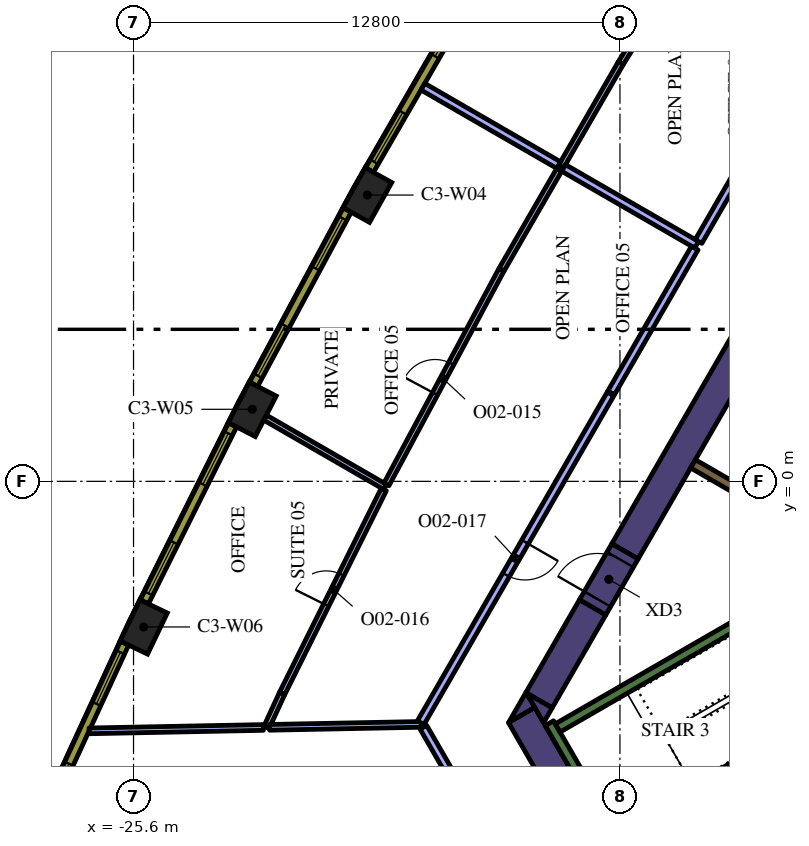
"""IFC4 building model, lengths in metres.
Left out: names, types, materials, properties, quantities, classifications, styles, units other than length and angle.
Written with IfcOpenShell. Run it as: python <this file> out.ifc"""

import sys

from ifc_helpers import new_model, si_unit, direction, frame, frame_2d, origin, origin_2d, place, context, subcontext, project, spatial, polyline, rectangle, outline, extrude, element, fill, save


model = new_model("IFC4")
c1 = context("Model", 3, precision=1e-05, world=origin(), true_north=direction((0.0, 1.0)))
c2 = subcontext(c1, "Body", "Model", "MODEL_VIEW")
j1 = project(units=[si_unit("LENGTHUNIT", "METRE"), si_unit("PLANEANGLEUNIT", "RADIAN")], contexts=[c1])
p1 = place(None, origin())
s1 = spatial("IfcSite", under=j1, at=p1, CompositionType="ELEMENT")
p2 = place(p1, origin())
s2 = spatial("IfcBuilding", under=s1, at=p2, CompositionType="ELEMENT")
p3 = place(p2, frame((0.0, 0.0, 162.6)))
s3 = spatial("IfcBuildingStorey", under=s2, at=p3, CompositionType="ELEMENT", Elevation=162.6)
for number, where, z_axis, x_axis in (
    (1, (-19.447, 7.533, 0.0), (0.0, 0.0, 1.0), (-0.487, -0.874, 0.0)),
    (2, (-22.476, 1.896, 0.0), (0.0, 0.0, 1.0), (-0.46, -0.888, 0.0)),
    (3, (-25.332, -3.832, 0.0), (0.0, 0.0, 1.0), (-0.433, -0.902, 0.0)),
):
    element("IfcColumn", number, at=place(p3, frame(where, z_axis=z_axis, x_axis=x_axis)), inside=s3, PredefinedType="COLUMN", context=c2, shape_type="SweptSolid", body=[
        extrude(rectangle(XDim=1.2, YDim=0.8, at=origin_2d()), origin(), (0.0, 0.0, 1.0), 4.2),
    ])
p4 = place(p3, frame((-15.387, -6.148, 0.0), z_axis=(0.0, 0.0, 1.0), x_axis=(0.499984020225, -0.866034629516, 0.0)))
e4 = element("IfcWall", 4, at=p4, inside=s3, PredefinedType="SOLIDWALL", context=c2, shape_type="SweptSolid", body=[
    extrude(rectangle(XDim=3.824, YDim=0.8, at=frame_2d((1.912, 0.0))), origin(), (0.0, 0.0, 1.0), 4.2),
])
p5 = place(p3, origin())
e5 = element("IfcWall", 5, at=p5, inside=s3, PredefinedType="SOLIDWALL", context=c2, shape_type="SweptSolid", body=[
    extrude(outline(polyline([(-15.042, -5.947), (-15.729, -6.343), (-15.271, -5.55), (-15.042, -5.947)])), origin(), (0.0, 0.0, 1.0), 4.2),
])
p6 = place(p3, frame((-13.518, -3.314, 0.0), z_axis=(0.0, 0.0, 1.0), x_axis=(-0.499969377405, -0.866043083026, 0.0)))
e6 = element("IfcWall", 6, at=p6, inside=s3, PredefinedType="SOLIDWALL", context=c2, shape_type="SweptSolid", body=[
    extrude(rectangle(XDim=2.824, YDim=0.8, at=frame_2d((1.412, 0.0))), origin(), (0.0, 0.0, 1.0), 4.2),
])
e7 = element("IfcWall", 7, at=p5, inside=s3, PredefinedType="SOLIDWALL", context=c2, shape_type="SweptSolid", body=[
    extrude(outline(polyline([(-14.809, -6.35), (-15.257, -5.574), (-14.585, -5.962), (-14.809, -6.35)])), origin(), (0.0, 0.0, 1.0), 4.2),
])
p7 = place(p3, frame((-12.668, -1.842, 0.0), z_axis=(0.0, 0.0, 1.0), x_axis=(0.500003640647, 0.866023301845, 0.0)))
e8 = element("IfcWall", 8, at=p7, inside=s3, PredefinedType="SOLIDWALL", context=c2, shape_type="SweptSolid", body=[
    extrude(rectangle(XDim=15.858, YDim=0.8, at=frame_2d((7.929, 0.0))), origin(), (0.0, 0.0, 1.0), 4.2),
])
p8 = place(p3, frame((-12.84, -9.511, 0.0), z_axis=(0.0, 0.0, 1.0), x_axis=(-0.499997733992, 0.866026712061, 0.0)))
e9 = element("IfcWall", 9, at=p8, inside=s3, PredefinedType="SOLIDWALL", context=c2, shape_type="SweptSolid", body=[
    extrude(rectangle(XDim=3.634, YDim=0.25, at=frame_2d((1.817, 0.0))), origin(), (0.0, 0.0, 1.0), 4.2),
])
p9 = place(p3, frame((-14.44, -6.49, 0.0), z_axis=(0.0, 0.0, 1.0), x_axis=(0.866022966069, 0.500004222222, 0.0)))
e10 = element("IfcWall", 10, at=p9, inside=s3, PredefinedType="SOLIDWALL", context=c2, shape_type="SweptSolid", body=[
    extrude(rectangle(XDim=6.8, YDim=0.25, at=frame_2d((3.4, 0.0))), origin(), (0.0, 0.0, 1.0), 4.2),
])
p10 = place(p3, frame((-12.84, -9.261, 0.0), z_axis=(0.0, 0.0, 1.0), x_axis=(0.866016039709, 0.500016218704, 0.0)))
e11 = element("IfcWall", 11, at=p10, inside=s3, PredefinedType="SOLIDWALL", context=c2, shape_type="SweptSolid", body=[
    extrude(rectangle(XDim=7.05, YDim=0.25, at=frame_2d((3.525, 0.0))), origin(), (0.0, 0.0, 1.0), 4.2),
])
p11 = place(p3, frame((-8.106, -1.14, 0.0), z_axis=(0.0, 0.0, 1.0), x_axis=(-0.866008981251, 0.500028443584, 0.0)))
e12 = element("IfcWall", 12, at=p11, inside=s3, PredefinedType="SOLIDWALL", context=c2, shape_type="SweptSolid", body=[
    extrude(rectangle(XDim=3.2, YDim=0.25, at=frame_2d((1.6, 0.0))), origin(), (0.0, 0.0, 1.0), 4.2),
])
p12 = place(p3, frame((-13.518, -3.314, 0.0), z_axis=(0.0, 0.0, 1.0), x_axis=(0.500062241894, 0.865989465428, 0.0)))
e13 = element("IfcWall", 13, at=p12, inside=s3, PredefinedType="SOLIDWALL", context=c2, shape_type="SweptSolid", body=[
    extrude(rectangle(XDim=1.7, YDim=0.8, at=frame_2d((0.85, 0.0))), origin(), (0.0, 0.0, 1.0), 4.2),
])
p13 = place(p12, frame((0.25, 0.0, 0.0)))
e14 = element("IfcOpeningElement", 14, at=p13, cuts=e13, PredefinedType="OPENING", context=c2, shape_type="SweptSolid", body=[
    extrude(rectangle(XDim=1.2, YDim=2.1, at=frame_2d((0.6, 1.05))), frame((0.0, 0.41, 0.0), z_axis=(0.0, -1.0, 0.0), x_axis=(1.0, 0.0, 0.0)), (0.0, 0.0, 1.0), 0.82),
])
p14 = place(p3, frame((-12.779, 11.002, 0.0), z_axis=(0.0, 0.0, 1.0), x_axis=(0.527026092571, 0.849849102929, 0.0)))
e15 = element("IfcWall", 15, at=p14, inside=s3, PredefinedType="PARTITIONING", context=c2, shape_type="SweptSolid", body=[
    extrude(rectangle(XDim=6.407, YDim=0.15, at=frame_2d((3.204, 0.0))), origin(), (0.0, 0.0, 1.0), 3.15),
])
p15 = place(p14, frame((2.707, 0.0, 0.0)))
e16 = element("IfcOpeningElement", 16, at=p15, cuts=e15, PredefinedType="OPENING", context=c2, shape_type="SweptSolid", body=[
    extrude(rectangle(XDim=0.9, YDim=2.1, at=frame_2d((0.45, 1.05))), frame((0.0, 0.085, 0.0), z_axis=(0.0, -1.0, 0.0), x_axis=(1.0, 0.0, 0.0)), (0.0, 0.0, 1.0), 0.17),
])
p16 = place(p3, frame((-12.779, 11.002, 0.0), z_axis=(0.0, 0.0, 1.0), x_axis=(-0.499996312652, -0.866027532665, 0.0)))
e17 = element("IfcWall", 17, at=p16, inside=s3, PredefinedType="PARTITIONING", context=c2, shape_type="SweptSolid", body=[
    extrude(rectangle(XDim=3.138, YDim=0.15, at=frame_2d((1.569, 0.0))), origin(), (0.0, 0.0, 1.0), 3.15),
])
p17 = place(p3, frame((-14.413, 8.322, 0.0), z_axis=(0.0, 0.0, 1.0), x_axis=(-0.866034795751, 0.499983732284, 0.0)))
e18 = element("IfcWall", 18, at=p17, inside=s3, PredefinedType="PARTITIONING", context=c2, shape_type="SweptSolid", body=[
    extrude(rectangle(XDim=4.125, YDim=0.2, at=frame_2d((2.062, 0.0))), origin(), (0.0, 0.0, 1.0), 3.15),
])
p18 = place(p3, frame((-10.782, 6.225, 0.0), z_axis=(0.0, 0.0, 1.0), x_axis=(-0.866034752867, 0.499983806564, 0.0)))
e19 = element("IfcWall", 19, at=p18, inside=s3, PredefinedType="PARTITIONING", context=c2, shape_type="SweptSolid", body=[
    extrude(rectangle(XDim=4.043, YDim=0.2, at=frame_2d((2.021, 0.0))), origin(), (0.0, 0.0, 1.0), 3.15),
])
p19 = place(p3, frame((-8.532, 10.122, 0.0), z_axis=(0.0, 0.0, 1.0), x_axis=(-0.499988222896, -0.866032203192, 0.0)))
e20 = element("IfcWall", 20, at=p19, inside=s3, PredefinedType="PARTITIONING", context=c2, shape_type="SweptSolid", body=[
    extrude(rectangle(XDim=4.4, YDim=0.2, at=frame_2d((2.2, 0.0))), origin(), (0.0, 0.0, 1.0), 3.15),
])
p20 = place(p3, frame((-18.98, -0.147, 0.0), z_axis=(0.0, 0.0, 1.0), x_axis=(-0.866035116605, 0.499983176524, 0.0)))
e21 = element("IfcWall", 21, at=p20, inside=s3, PredefinedType="PARTITIONING", context=c2, shape_type="SweptSolid", body=[
    extrude(rectangle(XDim=3.648, YDim=0.15, at=frame_2d((1.824, 0.0))), origin(), (0.0, 0.0, 1.0), 3.15),
])
p21 = place(p3, frame((-14.398, 8.198, 0.0), z_axis=(0.0, 0.0, 1.0), x_axis=(-0.499993740961, -0.866029017412, 0.0)))
e22 = element("IfcWall", 22, at=p21, inside=s3, PredefinedType="PARTITIONING", context=c2, shape_type="SweptSolid", body=[
    extrude(rectangle(XDim=3.038, YDim=0.15, at=frame_2d((1.519, 0.0))), origin(), (0.0, 0.0, 1.0), 3.15),
])
p22 = place(p3, frame((-18.945, -0.081, 0.0), z_axis=(0.0, 0.0, 1.0), x_axis=(0.472485737981, 0.881338316088, 0.0)))
e23 = element("IfcWall", 23, at=p22, inside=s3, PredefinedType="PARTITIONING", context=c2, shape_type="SweptSolid", body=[
    extrude(rectangle(XDim=6.407, YDim=0.15, at=frame_2d((3.204, 0.0))), origin(), (0.0, 0.0, 1.0), 3.15),
])
p23 = place(p22, frame((2.707, 0.0, 0.0)))
e24 = element("IfcOpeningElement", 24, at=p23, cuts=e23, PredefinedType="OPENING", context=c2, shape_type="SweptSolid", body=[
    extrude(rectangle(XDim=0.9, YDim=2.1, at=frame_2d((0.45, 1.05))), frame((0.0, 0.085, 0.0), z_axis=(0.0, -1.0, 0.0), x_axis=(1.0, 0.0, 0.0)), (0.0, 0.0, 1.0), 0.17),
])
p24 = place(p3, frame((-21.689, -5.579, 0.0), z_axis=(0.0, 0.0, 1.0), x_axis=(0.446219729364, 0.894923434225, 0.0)))
e25 = element("IfcWall", 25, at=p24, inside=s3, PredefinedType="PARTITIONING", context=c2, shape_type="SweptSolid", body=[
    extrude(rectangle(XDim=5.995, YDim=0.15, at=frame_2d((2.998, 0.0))), origin(), (0.0, 0.0, 1.0), 3.15),
])
p25 = place(p24, frame((2.595, 0.0, 0.0)))
e26 = element("IfcOpeningElement", 26, at=p25, cuts=e25, PredefinedType="OPENING", context=c2, shape_type="SweptSolid", body=[
    extrude(rectangle(XDim=0.9, YDim=2.1, at=frame_2d((0.45, 1.05))), frame((0.0, 0.085, 0.0), z_axis=(0.0, -1.0, 0.0), x_axis=(1.0, 0.0, 0.0)), (0.0, 0.0, 1.0), 0.17),
])
p26 = place(p3, frame((-21.689, -5.579, 0.0), z_axis=(0.0, 0.0, 1.0), x_axis=(-0.418649696334, -0.908147802816, 0.0)))
e27 = element("IfcWall", 27, at=p26, inside=s3, PredefinedType="PARTITIONING", context=c2, shape_type="SweptSolid", body=[
    extrude(rectangle(XDim=0.986, YDim=0.15, at=frame_2d((0.493, 0.0))), origin(), (0.0, 0.0, 1.0), 3.15),
])
p27 = place(p3, frame((-22.185, -6.476, 0.0), z_axis=(0.0, 0.0, 1.0), x_axis=(-0.999810025733, -0.019491342784, 0.0)))
e28 = element("IfcWall", 28, at=p27, inside=s3, PredefinedType="PARTITIONING", context=c2, shape_type="SweptSolid", body=[
    extrude(rectangle(XDim=4.584, YDim=0.15, at=frame_2d((2.292, 0.0))), origin(), (0.0, 0.0, 1.0), 3.15),
])
p28 = place(p3, frame((-18.016, -6.395, 0.0), z_axis=(0.0, 0.0, 1.0), x_axis=(-0.999809528944, -0.019516808959, 0.0)))
e29 = element("IfcWall", 29, at=p28, inside=s3, PredefinedType="PARTITIONING", context=c2, shape_type="SweptSolid", body=[
    extrude(rectangle(XDim=4.003, YDim=0.15, at=frame_2d((2.001, 0.0))), origin(), (0.0, 0.0, 1.0), 3.15),
])
p29 = place(p3, frame((-10.832, 6.138, 0.0), z_axis=(0.0, 0.0, 1.0), x_axis=(-0.499988222896, -0.866032203192, 0.0)))
e30 = element("IfcWall", 30, at=p29, inside=s3, PredefinedType="PARTITIONING", context=c2, shape_type="SweptSolid", body=[
    extrude(rectangle(XDim=4.4, YDim=0.2, at=frame_2d((2.2, 0.0))), origin(), (0.0, 0.0, 1.0), 3.15),
])
p30 = place(p3, frame((-13.047, 2.302, 0.0), z_axis=(0.0, 0.0, 1.0), x_axis=(-0.499986873641, -0.866032982159, 0.0)))
e31 = element("IfcWall", 31, at=p30, inside=s3, PredefinedType="PARTITIONING", context=c2, shape_type="SweptSolid", body=[
    extrude(rectangle(XDim=9.99, YDim=0.2, at=frame_2d((4.995, 0.0))), origin(), (0.0, 0.0, 1.0), 3.15),
])
p31 = place(p30, frame((4.5, 0.0, 0.0)))
e32 = element("IfcOpeningElement", 32, at=p31, cuts=e31, PredefinedType="OPENING", context=c2, shape_type="SweptSolid", body=[
    extrude(rectangle(XDim=1.0, YDim=2.1, at=frame_2d((0.5, 1.05))), frame((0.0, 0.11, 0.0), z_axis=(0.0, -1.0, 0.0), x_axis=(1.0, 0.0, 0.0)), (0.0, 0.0, 1.0), 0.22),
])
p32 = place(p3, frame((-17.974, -6.469, 0.0), z_axis=(0.0, 0.0, 1.0), x_axis=(0.499961062019, -0.866047883471, 0.0)))
e33 = element("IfcWall", 33, at=p32, inside=s3, PredefinedType="PARTITIONING", context=c2, shape_type="SweptSolid", body=[
    extrude(rectangle(XDim=2.185, YDim=0.2, at=frame_2d((1.092, 0.0))), origin(), (0.0, 0.0, 1.0), 3.15),
])
p33 = place(p3, frame((-16.789, 12.697, 0.0), z_axis=(0.0, 0.0, 1.0), x_axis=(-0.500009456303, -0.866019944116, 0.0)))
e34 = element("IfcWall", 34, at=p33, inside=s3, PredefinedType="SOLIDWALL", context=c2, shape_type="SweptSolid", body=[
    extrude(rectangle(XDim=5.204, YDim=0.24, at=frame_2d((2.602, 0.0))), origin(), (0.0, 0.0, 1.0), 3.95),
])
p34 = place(p33, frame((0.248, 0.0, 0.9)))
e35 = element("IfcOpeningElement", 35, at=p34, cuts=e34, PredefinedType="OPENING", context=c2, shape_type="SweptSolid", body=[
    extrude(rectangle(XDim=1.5, YDim=2.55, at=frame_2d((0.75, 1.275))), frame((0.0, 0.13, 0.0), z_axis=(0.0, -1.0, 0.0), x_axis=(1.0, 0.0, 0.0)), (0.0, 0.0, 1.0), 0.26),
])
p35 = place(p33, frame((3.455, 0.0, 0.9)))
e36 = element("IfcOpeningElement", 36, at=p35, cuts=e34, PredefinedType="OPENING", context=c2, shape_type="SweptSolid", body=[
    extrude(rectangle(XDim=1.5, YDim=2.55, at=frame_2d((0.75, 1.275))), frame((0.0, 0.13, 0.0), z_axis=(0.0, -1.0, 0.0), x_axis=(1.0, 0.0, 0.0)), (0.0, 0.0, 1.0), 0.26),
])
p36 = place(p3, frame((-19.977, 7.139, 0.0), z_axis=(0.0, 0.0, 1.0), x_axis=(-0.473349833294, -0.880874528704, 0.0)))
e37 = element("IfcWall", 37, at=p36, inside=s3, PredefinedType="SOLIDWALL", context=c2, shape_type="SweptSolid", body=[
    extrude(rectangle(XDim=5.204, YDim=0.24, at=frame_2d((2.602, 0.0))), origin(), (0.0, 0.0, 1.0), 3.95),
])
p37 = place(p36, frame((0.248, 0.0, 0.9)))
e38 = element("IfcOpeningElement", 38, at=p37, cuts=e37, PredefinedType="OPENING", context=c2, shape_type="SweptSolid", body=[
    extrude(rectangle(XDim=1.5, YDim=2.55, at=frame_2d((0.75, 1.275))), frame((0.0, 0.13, 0.0), z_axis=(0.0, -1.0, 0.0), x_axis=(1.0, 0.0, 0.0)), (0.0, 0.0, 1.0), 0.26),
])
p38 = place(p36, frame((3.455, 0.0, 0.9)))
e39 = element("IfcOpeningElement", 39, at=p38, cuts=e37, PredefinedType="OPENING", context=c2, shape_type="SweptSolid", body=[
    extrude(rectangle(XDim=1.5, YDim=2.55, at=frame_2d((0.75, 1.275))), frame((0.0, 0.13, 0.0), z_axis=(0.0, -1.0, 0.0), x_axis=(1.0, 0.0, 0.0)), (0.0, 0.0, 1.0), 0.26),
])
p39 = place(p3, frame((-22.994, 1.485, 0.0), z_axis=(0.0, 0.0, 1.0), x_axis=(-0.446256171312, -0.8949052629, 0.0)))
e40 = element("IfcWall", 40, at=p39, inside=s3, PredefinedType="SOLIDWALL", context=c2, shape_type="SweptSolid", body=[
    extrude(rectangle(XDim=5.203, YDim=0.24, at=frame_2d((2.602, 0.0))), origin(), (0.0, 0.0, 1.0), 3.95),
])
p40 = place(p39, frame((0.248, 0.0, 0.9)))
e41 = element("IfcOpeningElement", 41, at=p40, cuts=e40, PredefinedType="OPENING", context=c2, shape_type="SweptSolid", body=[
    extrude(rectangle(XDim=1.5, YDim=2.55, at=frame_2d((0.75, 1.275))), frame((0.0, 0.13, 0.0), z_axis=(0.0, -1.0, 0.0), x_axis=(1.0, 0.0, 0.0)), (0.0, 0.0, 1.0), 0.26),
])
p41 = place(p39, frame((3.455, 0.0, 0.9)))
e42 = element("IfcOpeningElement", 42, at=p41, cuts=e40, PredefinedType="OPENING", context=c2, shape_type="SweptSolid", body=[
    extrude(rectangle(XDim=1.5, YDim=2.55, at=frame_2d((0.75, 1.275))), frame((0.0, 0.13, 0.0), z_axis=(0.0, -1.0, 0.0), x_axis=(1.0, 0.0, 0.0)), (0.0, 0.0, 1.0), 0.26),
])
p42 = place(p3, frame((-25.837, -4.258, 0.0), z_axis=(0.0, 0.0, 1.0), x_axis=(-0.418722559465, -0.908114209885, 0.0)))
e43 = element("IfcWall", 43, at=p42, inside=s3, PredefinedType="SOLIDWALL", context=c2, shape_type="SweptSolid", body=[
    extrude(rectangle(XDim=5.213, YDim=0.24, at=frame_2d((2.606, 0.0))), origin(), (0.0, 0.0, 1.0), 3.95),
])
p43 = place(p42, frame((0.261, 0.0, 0.9)))
e44 = element("IfcOpeningElement", 44, at=p43, cuts=e43, PredefinedType="OPENING", context=c2, shape_type="SweptSolid", body=[
    extrude(rectangle(XDim=1.5, YDim=2.55, at=frame_2d((0.75, 1.275))), frame((0.0, 0.13, 0.0), z_axis=(0.0, -1.0, 0.0), x_axis=(1.0, 0.0, 0.0)), (0.0, 0.0, 1.0), 0.26),
])
p44 = place(p42, frame((3.492, 0.0, 0.9)))
e45 = element("IfcOpeningElement", 45, at=p44, cuts=e43, PredefinedType="OPENING", context=c2, shape_type="SweptSolid", body=[
    extrude(rectangle(XDim=1.5, YDim=2.55, at=frame_2d((0.75, 1.275))), frame((0.0, 0.13, 0.0), z_axis=(0.0, -1.0, 0.0), x_axis=(1.0, 0.0, 0.0)), (0.0, 0.0, 1.0), 0.26),
])
p45 = place(p13, origin())
e46 = element("IfcDoor", 46, at=p45, inside=s3, OperationType="SINGLE_SWING_LEFT", PredefinedType="DOOR", context=c2, shape_type="SweptSolid", body=[
    extrude(rectangle(XDim=1.2, YDim=2.1, at=frame_2d((0.6, 1.05))), frame((0.0, 0.025, 0.0), z_axis=(0.0, -1.0, 0.0), x_axis=(1.0, 0.0, 0.0)), (0.0, 0.0, 1.0), 0.05),
])
fill(e14, e46)
p46 = place(p23, origin())
e47 = element("IfcDoor", 47, at=p46, inside=s3, OperationType="SINGLE_SWING_LEFT", PredefinedType="DOOR", context=c2, shape_type="SweptSolid", body=[
    extrude(rectangle(XDim=0.9, YDim=2.1, at=frame_2d((0.45, 1.05))), frame((0.0, 0.025, 0.0), z_axis=(0.0, -1.0, 0.0), x_axis=(1.0, 0.0, 0.0)), (0.0, 0.0, 1.0), 0.05),
])
fill(e24, e47)
p47 = place(p25, origin())
e48 = element("IfcDoor", 48, at=p47, inside=s3, OperationType="SINGLE_SWING_RIGHT", PredefinedType="DOOR", context=c2, shape_type="SweptSolid", body=[
    extrude(rectangle(XDim=0.9, YDim=2.1, at=frame_2d((0.45, 1.05))), frame((0.0, 0.025, 0.0), z_axis=(0.0, -1.0, 0.0), x_axis=(1.0, 0.0, 0.0)), (0.0, 0.0, 1.0), 0.05),
])
fill(e26, e48)
p48 = place(p31, origin())
e49 = element("IfcDoor", 49, at=p48, inside=s3, OperationType="SINGLE_SWING_RIGHT", PredefinedType="DOOR", context=c2, shape_type="SweptSolid", body=[
    extrude(rectangle(XDim=1.0, YDim=2.1, at=frame_2d((0.5, 1.05))), frame((0.0, 0.025, 0.0), z_axis=(0.0, -1.0, 0.0), x_axis=(1.0, 0.0, 0.0)), (0.0, 0.0, 1.0), 0.05),
])
fill(e32, e49)
p49 = place(p34, origin())
e50 = element("IfcWindow", 50, at=p49, inside=s3, PartitioningType="SINGLE_PANEL", PredefinedType="WINDOW", context=c2, shape_type="SweptSolid", body=[
    extrude(rectangle(XDim=1.5, YDim=2.55, at=frame_2d((0.75, 1.275))), frame((0.0, 0.04, 0.0), z_axis=(0.0, -1.0, 0.0), x_axis=(1.0, 0.0, 0.0)), (0.0, 0.0, 1.0), 0.06),
])
fill(e35, e50)
p50 = place(p35, origin())
e51 = element("IfcWindow", 51, at=p50, inside=s3, PartitioningType="SINGLE_PANEL", PredefinedType="WINDOW", context=c2, shape_type="SweptSolid", body=[
    extrude(rectangle(XDim=1.5, YDim=2.55, at=frame_2d((0.75, 1.275))), frame((0.0, 0.04, 0.0), z_axis=(0.0, -1.0, 0.0), x_axis=(1.0, 0.0, 0.0)), (0.0, 0.0, 1.0), 0.06),
])
fill(e36, e51)
p51 = place(p37, origin())
e52 = element("IfcWindow", 52, at=p51, inside=s3, PartitioningType="SINGLE_PANEL", PredefinedType="WINDOW", context=c2, shape_type="SweptSolid", body=[
    extrude(rectangle(XDim=1.5, YDim=2.55, at=frame_2d((0.75, 1.275))), frame((0.0, 0.04, 0.0), z_axis=(0.0, -1.0, 0.0), x_axis=(1.0, 0.0, 0.0)), (0.0, 0.0, 1.0), 0.06),
])
fill(e38, e52)
p52 = place(p38, origin())
e53 = element("IfcWindow", 53, at=p52, inside=s3, PartitioningType="SINGLE_PANEL", PredefinedType="WINDOW", context=c2, shape_type="SweptSolid", body=[
    extrude(rectangle(XDim=1.5, YDim=2.55, at=frame_2d((0.75, 1.275))), frame((0.0, 0.04, 0.0), z_axis=(0.0, -1.0, 0.0), x_axis=(1.0, 0.0, 0.0)), (0.0, 0.0, 1.0), 0.06),
])
fill(e39, e53)
p53 = place(p40, origin())
e54 = element("IfcWindow", 54, at=p53, inside=s3, PartitioningType="SINGLE_PANEL", PredefinedType="WINDOW", context=c2, shape_type="SweptSolid", body=[
    extrude(rectangle(XDim=1.5, YDim=2.55, at=frame_2d((0.75, 1.275))), frame((0.0, 0.04, 0.0), z_axis=(0.0, -1.0, 0.0), x_axis=(1.0, 0.0, 0.0)), (0.0, 0.0, 1.0), 0.06),
])
fill(e41, e54)
p54 = place(p41, origin())
e55 = element("IfcWindow", 55, at=p54, inside=s3, PartitioningType="SINGLE_PANEL", PredefinedType="WINDOW", context=c2, shape_type="SweptSolid", body=[
    extrude(rectangle(XDim=1.5, YDim=2.55, at=frame_2d((0.75, 1.275))), frame((0.0, 0.04, 0.0), z_axis=(0.0, -1.0, 0.0), x_axis=(1.0, 0.0, 0.0)), (0.0, 0.0, 1.0), 0.06),
])
fill(e42, e55)
p55 = place(p43, origin())
e56 = element("IfcWindow", 56, at=p55, inside=s3, PartitioningType="SINGLE_PANEL", PredefinedType="WINDOW", context=c2, shape_type="SweptSolid", body=[
    extrude(rectangle(XDim=1.5, YDim=2.55, at=frame_2d((0.75, 1.275))), frame((0.0, 0.04, 0.0), z_axis=(0.0, -1.0, 0.0), x_axis=(1.0, 0.0, 0.0)), (0.0, 0.0, 1.0), 0.06),
])
fill(e44, e56)
p56 = place(p44, origin())
e57 = element("IfcWindow", 57, at=p56, inside=s3, PartitioningType="SINGLE_PANEL", PredefinedType="WINDOW", context=c2, shape_type="SweptSolid", body=[
    extrude(rectangle(XDim=1.5, YDim=2.55, at=frame_2d((0.75, 1.275))), frame((0.0, 0.04, 0.0), z_axis=(0.0, -1.0, 0.0), x_axis=(1.0, 0.0, 0.0)), (0.0, 0.0, 1.0), 0.06),
])
fill(e45, e57)
save(model, sys.argv[1])
